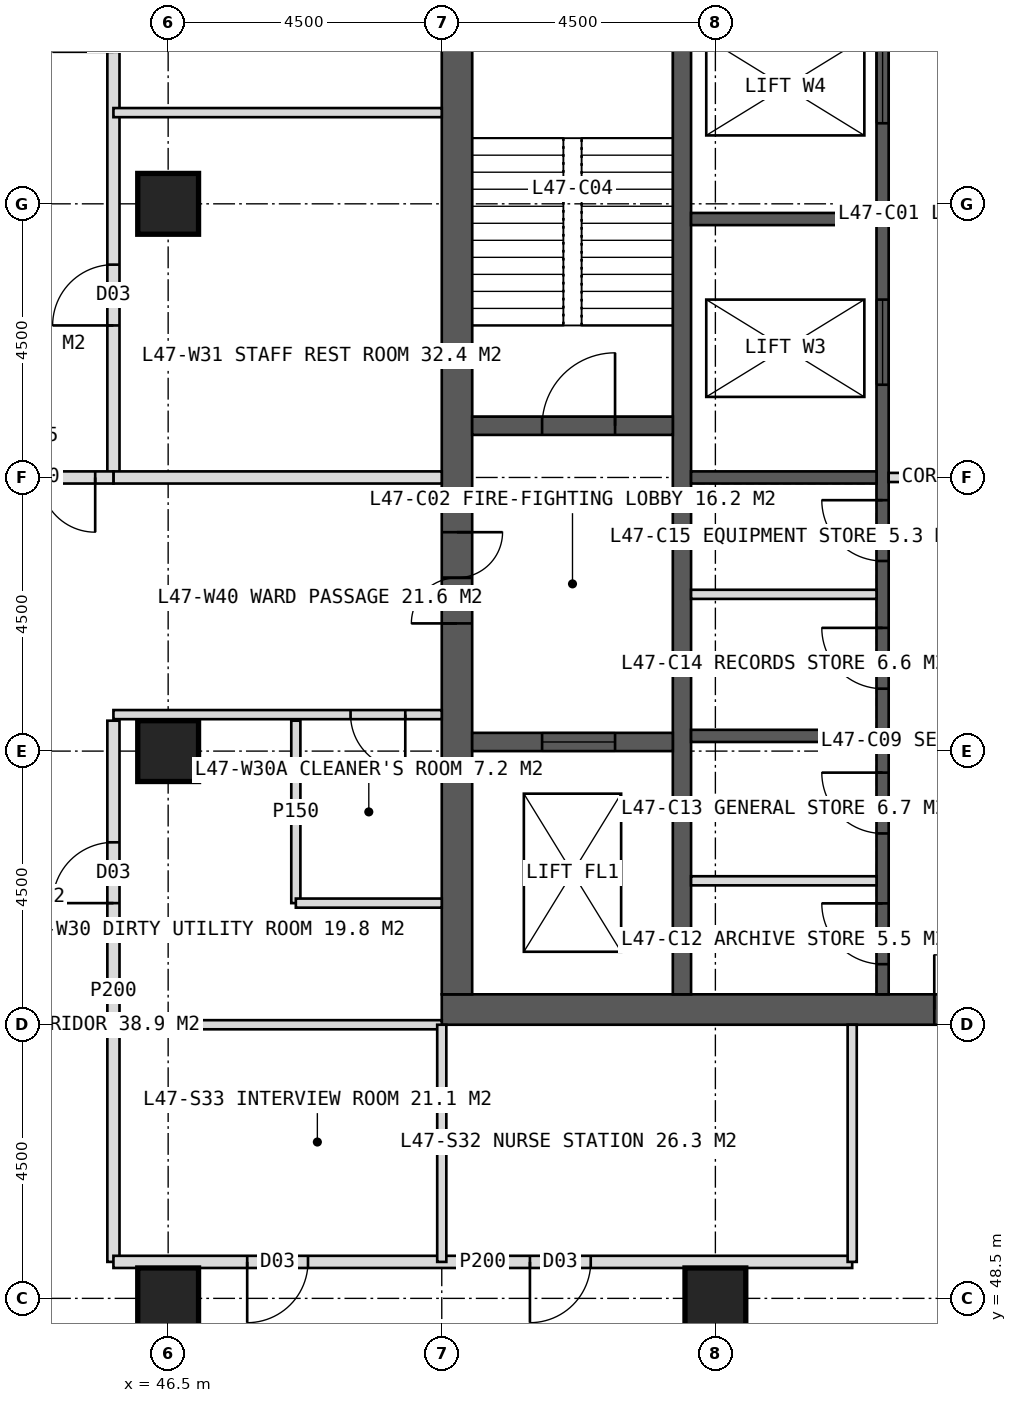
"""IFC4 building model, lengths in metres.
Left out: names, types, materials, properties, quantities, classifications, styles, units other than length and angle.
Written with IfcOpenShell. Run it as: python <this file> out.ifc"""

import sys

from ifc_helpers import new_model, si_unit, direction, frame, frame_2d, origin, origin_2d, place, context, subcontext, project, spatial, rectangle, hollow_rectangle, extrude, element, fill, save


model = new_model("IFC4")
c1 = context("Model", 3, precision=1e-05, world=origin(), true_north=direction((0.0, 1.0)))
c2 = subcontext(c1, "Body", "Model", "MODEL_VIEW")
j1 = project(units=[si_unit("LENGTHUNIT", "METRE"), si_unit("PLANEANGLEUNIT", "RADIAN")], contexts=[c1])
p1 = place(None, origin())
s1 = spatial("IfcSite", under=j1, at=p1, CompositionType="ELEMENT")
p2 = place(p1, origin())
s2 = spatial("IfcBuilding", under=s1, at=p2, CompositionType="ELEMENT")
p3 = place(p2, frame((0.0, 0.0, 197.0)))
s3 = spatial("IfcBuildingStorey", under=s2, at=p3, CompositionType="ELEMENT", Elevation=197.0)
p4 = place(p3, frame((51.0, 53.25, 0.0), z_axis=(0.0, 0.0, 1.0), x_axis=(1.0, 0.0, 0.0)))
e1 = element("IfcWall", 1, at=p4, inside=s3, PredefinedType="SHEAR", context=c2, shape_type="SweptSolid", body=[
    extrude(rectangle(XDim=18.0, YDim=0.5, at=frame_2d((9.0, 0.0))), origin(), (0.0, 0.0, 1.0), 4.0),
])
p5 = place(p4, frame((8.1, 0.0, 0.0)))
e2 = element("IfcOpeningElement", 2, at=p5, cuts=e1, PredefinedType="OPENING", context=c2, shape_type="SweptSolid", body=[
    extrude(rectangle(XDim=1.8, YDim=2.2, at=frame_2d((0.9, 1.1))), frame((0.0, 0.26, 0.0), z_axis=(0.0, -1.0, 0.0), x_axis=(1.0, 0.0, 0.0)), (0.0, 0.0, 1.0), 0.52),
])
p6 = place(p3, frame((51.25, 53.5, 0.0), z_axis=(0.0, 0.0, 1.0), x_axis=(0.0, 1.0, 0.0)))
e3 = element("IfcWall", 3, at=p6, inside=s3, PredefinedType="SHEAR", context=c2, shape_type="SweptSolid", body=[
    extrude(rectangle(XDim=17.0, YDim=0.5, at=frame_2d((8.5, 0.0))), origin(), (0.0, 0.0, 1.0), 4.0),
])
p7 = place(p6, frame((6.1, 0.0, 0.0)))
e4 = element("IfcOpeningElement", 4, at=p7, cuts=e3, PredefinedType="OPENING", context=c2, shape_type="SweptSolid", body=[
    extrude(rectangle(XDim=1.5, YDim=2.2, at=frame_2d((0.75, 1.1))), frame((0.0, 0.26, 0.0), z_axis=(0.0, -1.0, 0.0), x_axis=(1.0, 0.0, 0.0)), (0.0, 0.0, 1.0), 0.52),
])
p8 = place(p3, frame((54.95, 53.5, 0.0), z_axis=(0.0, 0.0, 1.0), x_axis=(0.0, 1.0, 0.0)))
e5 = element("IfcWall", 5, at=p8, inside=s3, PredefinedType="SHEAR", context=c2, shape_type="SweptSolid", body=[
    extrude(rectangle(XDim=17.0, YDim=0.3, at=frame_2d((8.5, 0.0))), origin(), (0.0, 0.0, 1.0), 4.0),
])
p9 = place(p3, frame((58.25, 53.5, 0.0), z_axis=(0.0, 0.0, 1.0), x_axis=(0.0, 1.0, 0.0)))
e6 = element("IfcWall", 6, at=p9, inside=s3, PredefinedType="SHEAR", context=c2, shape_type="SweptSolid", body=[
    extrude(rectangle(XDim=17.0, YDim=0.2, at=frame_2d((8.5, 0.0))), origin(), (0.0, 0.0, 1.0), 4.0),
])
p10 = place(p9, frame((0.496, 0.0, 0.0)))
e7 = element("IfcOpeningElement", 7, at=p10, cuts=e6, PredefinedType="OPENING", context=c2, shape_type="SweptSolid", body=[
    extrude(rectangle(XDim=1.0, YDim=2.1, at=frame_2d((0.5, 1.05))), frame((0.0, 0.11, 0.0), z_axis=(0.0, -1.0, 0.0), x_axis=(1.0, 0.0, 0.0)), (0.0, 0.0, 1.0), 0.22),
])
p11 = place(p9, frame((2.646, 0.0, 0.0)))
e8 = element("IfcOpeningElement", 8, at=p11, cuts=e6, PredefinedType="OPENING", context=c2, shape_type="SweptSolid", body=[
    extrude(rectangle(XDim=1.0, YDim=2.1, at=frame_2d((0.5, 1.05))), frame((0.0, 0.11, 0.0), z_axis=(0.0, -1.0, 0.0), x_axis=(1.0, 0.0, 0.0)), (0.0, 0.0, 1.0), 0.22),
])
p12 = place(p9, frame((5.027, 0.0, 0.0)))
e9 = element("IfcOpeningElement", 9, at=p12, cuts=e6, PredefinedType="OPENING", context=c2, shape_type="SweptSolid", body=[
    extrude(rectangle(XDim=1.0, YDim=2.1, at=frame_2d((0.5, 1.05))), frame((0.0, 0.11, 0.0), z_axis=(0.0, -1.0, 0.0), x_axis=(1.0, 0.0, 0.0)), (0.0, 0.0, 1.0), 0.22),
])
p13 = place(p9, frame((7.126, 0.0, 0.0)))
e10 = element("IfcOpeningElement", 10, at=p13, cuts=e6, PredefinedType="OPENING", context=c2, shape_type="SweptSolid", body=[
    extrude(rectangle(XDim=1.0, YDim=2.1, at=frame_2d((0.5, 1.05))), frame((0.0, 0.11, 0.0), z_axis=(0.0, -1.0, 0.0), x_axis=(1.0, 0.0, 0.0)), (0.0, 0.0, 1.0), 0.22),
])
p14 = place(p9, frame((10.025, 0.0, 0.0)))
e11 = element("IfcOpeningElement", 11, at=p14, cuts=e6, PredefinedType="OPENING", context=c2, shape_type="SweptSolid", body=[
    extrude(rectangle(XDim=1.4, YDim=2.2, at=frame_2d((0.7, 1.1))), frame((0.0, 0.11, 0.0), z_axis=(0.0, -1.0, 0.0), x_axis=(1.0, 0.0, 0.0)), (0.0, 0.0, 1.0), 0.22),
])
p15 = place(p9, frame((14.325, 0.0, 0.0)))
e12 = element("IfcOpeningElement", 12, at=p15, cuts=e6, PredefinedType="OPENING", context=c2, shape_type="SweptSolid", body=[
    extrude(rectangle(XDim=1.4, YDim=2.2, at=frame_2d((0.7, 1.1))), frame((0.0, 0.11, 0.0), z_axis=(0.0, -1.0, 0.0), x_axis=(1.0, 0.0, 0.0)), (0.0, 0.0, 1.0), 0.22),
])
for number, where, z_axis, x_axis in (
    (13, (55.1, 57.75, 0.0), (0.0, 0.0, 1.0), (1.0, 0.0, 0.0)),
    (14, (55.1, 62.0, 0.0), (0.0, 0.0, 1.0), (1.0, 0.0, 0.0)),
    (15, (55.1, 66.25, 0.0), (0.0, 0.0, 1.0), (1.0, 0.0, 0.0)),
):
    element("IfcWall", number, at=place(p3, frame(where, z_axis=z_axis, x_axis=x_axis)), inside=s3, PredefinedType="SHEAR", context=c2, shape_type="SweptSolid", body=[
        extrude(rectangle(XDim=3.05, YDim=0.2, at=frame_2d((1.525, 0.0))), origin(), (0.0, 0.0, 1.0), 4.0),
    ])
p16 = place(p3, frame((51.5, 62.85, 0.0), z_axis=(0.0, 0.0, 1.0), x_axis=(1.0, 0.0, 0.0)))
e16 = element("IfcWall", 16, at=p16, inside=s3, PredefinedType="SHEAR", context=c2, shape_type="SweptSolid", body=[
    extrude(rectangle(XDim=3.3, YDim=0.3, at=frame_2d((1.65, 0.0))), origin(), (0.0, 0.0, 1.0), 4.0),
])
p17 = place(p16, frame((1.15, 0.0, 0.0)))
e17 = element("IfcOpeningElement", 17, at=p17, cuts=e16, PredefinedType="OPENING", context=c2, shape_type="SweptSolid", body=[
    extrude(rectangle(XDim=1.2, YDim=2.1, at=frame_2d((0.6, 1.05))), frame((0.0, 0.16, 0.0), z_axis=(0.0, -1.0, 0.0), x_axis=(1.0, 0.0, 0.0)), (0.0, 0.0, 1.0), 0.32),
])
p18 = place(p3, frame((51.5, 57.65, 0.0), z_axis=(0.0, 0.0, 1.0), x_axis=(1.0, 0.0, 0.0)))
e18 = element("IfcWall", 18, at=p18, inside=s3, PredefinedType="SHEAR", context=c2, shape_type="SweptSolid", body=[
    extrude(rectangle(XDim=3.3, YDim=0.3, at=frame_2d((1.65, 0.0))), origin(), (0.0, 0.0, 1.0), 4.0),
])
p19 = place(p18, frame((1.15, 0.0, 0.0)))
e19 = element("IfcOpeningElement", 19, at=p19, cuts=e18, PredefinedType="OPENING", context=c2, shape_type="SweptSolid", body=[
    extrude(rectangle(XDim=1.2, YDim=2.2, at=frame_2d((0.6, 1.1))), frame((0.0, 0.16, 0.0), z_axis=(0.0, -1.0, 0.0), x_axis=(1.0, 0.0, 0.0)), (0.0, 0.0, 1.0), 0.32),
])
for number, where, z_axis, x_axis in (
    (20, (46.5, 48.5, 0.0), (0.0, 0.0, 1.0), (1.0, 0.0, 0.0)),
    (21, (55.5, 48.5, 0.0), (0.0, 0.0, 1.0), (1.0, 0.0, 0.0)),
    (22, (46.5, 57.5, 0.0), (0.0, 0.0, 1.0), (1.0, 0.0, 0.0)),
    (23, (46.5, 66.5, 0.0), (0.0, 0.0, 1.0), (1.0, 0.0, 0.0)),
):
    element("IfcColumn", number, at=place(p3, frame(where, z_axis=z_axis, x_axis=x_axis)), inside=s3, PredefinedType="COLUMN", context=c2, shape_type="SweptSolid", body=[
        extrude(hollow_rectangle(XDim=1.0, YDim=1.0, WallThickness=0.1, at=origin_2d()), origin(), (0.0, 0.0, 1.0), 4.0),
    ])
p20 = place(p3, frame((51.0, 53.0, 0.0), z_axis=(0.0, 0.0, 1.0), x_axis=(-1.0, 0.0, 0.0)))
e24 = element("IfcWall", 24, at=p20, inside=s3, PredefinedType="PARTITIONING", context=c2, shape_type="SweptSolid", body=[
    extrude(rectangle(XDim=5.4, YDim=0.15, at=frame_2d((2.7, 0.0))), origin(), (0.0, 0.0, 1.0), 3.75),
])
p21 = place(p3, frame((45.6, 49.1, 0.0), z_axis=(0.0, 0.0, 1.0), x_axis=(0.0, 1.0, 0.0)))
e25 = element("IfcWall", 25, at=p21, inside=s3, PredefinedType="PARTITIONING", context=c2, shape_type="SweptSolid", body=[
    extrude(rectangle(XDim=8.9, YDim=0.2, at=frame_2d((4.45, 0.0))), origin(), (0.0, 0.0, 1.0), 3.75),
])
p22 = place(p21, frame((5.9, 0.0, 0.0)))
e26 = element("IfcOpeningElement", 26, at=p22, cuts=e25, PredefinedType="OPENING", context=c2, shape_type="SweptSolid", body=[
    extrude(rectangle(XDim=1.0, YDim=2.1, at=frame_2d((0.5, 1.05))), frame((0.0, 0.11, 0.0), z_axis=(0.0, -1.0, 0.0), x_axis=(1.0, 0.0, 0.0)), (0.0, 0.0, 1.0), 0.22),
])
p23 = place(p3, frame((45.6, 62.0, 0.0), z_axis=(0.0, 0.0, 1.0), x_axis=(0.0, 1.0, 0.0)))
e27 = element("IfcWall", 27, at=p23, inside=s3, PredefinedType="PARTITIONING", context=c2, shape_type="SweptSolid", body=[
    extrude(rectangle(XDim=14.4, YDim=0.2, at=frame_2d((7.2, 0.0))), origin(), (0.0, 0.0, 1.0), 3.75),
])
p24 = place(p23, frame((2.5, 0.0, 0.0)))
e28 = element("IfcOpeningElement", 28, at=p24, cuts=e27, PredefinedType="OPENING", context=c2, shape_type="SweptSolid", body=[
    extrude(rectangle(XDim=1.0, YDim=2.1, at=frame_2d((0.5, 1.05))), frame((0.0, 0.11, 0.0), z_axis=(0.0, -1.0, 0.0), x_axis=(1.0, 0.0, 0.0)), (0.0, 0.0, 1.0), 0.22),
])
p25 = place(p23, frame((7.0, 0.0, 0.0)))
e29 = element("IfcOpeningElement", 29, at=p25, cuts=e27, PredefinedType="OPENING", context=c2, shape_type="SweptSolid", body=[
    extrude(rectangle(XDim=1.0, YDim=2.1, at=frame_2d((0.5, 1.05))), frame((0.0, 0.11, 0.0), z_axis=(0.0, -1.0, 0.0), x_axis=(1.0, 0.0, 0.0)), (0.0, 0.0, 1.0), 0.22),
])
p26 = place(p23, frame((11.2, 0.0, 0.0)))
e30 = element("IfcOpeningElement", 30, at=p26, cuts=e27, PredefinedType="OPENING", context=c2, shape_type="SweptSolid", body=[
    extrude(rectangle(XDim=1.0, YDim=2.1, at=frame_2d((0.5, 1.05))), frame((0.0, 0.11, 0.0), z_axis=(0.0, -1.0, 0.0), x_axis=(1.0, 0.0, 0.0)), (0.0, 0.0, 1.0), 0.22),
])
p27 = place(p3, frame((51.0, 58.1, 0.0), z_axis=(0.0, 0.0, 1.0), x_axis=(-1.0, 0.0, 0.0)))
e31 = element("IfcWall", 31, at=p27, inside=s3, PredefinedType="PARTITIONING", context=c2, shape_type="SweptSolid", body=[
    extrude(rectangle(XDim=5.4, YDim=0.15, at=frame_2d((2.7, 0.0))), origin(), (0.0, 0.0, 1.0), 3.75),
])
p28 = place(p27, frame((0.6, 0.0, 0.0)))
e32 = element("IfcOpeningElement", 32, at=p28, cuts=e31, PredefinedType="OPENING", context=c2, shape_type="SweptSolid", body=[
    extrude(rectangle(XDim=0.9, YDim=2.1, at=frame_2d((0.45, 1.05))), frame((0.0, 0.085, 0.0), z_axis=(0.0, -1.0, 0.0), x_axis=(1.0, 0.0, 0.0)), (0.0, 0.0, 1.0), 0.17),
])
p29 = place(p3, frame((51.0, 62.0, 0.0), z_axis=(0.0, 0.0, 1.0), x_axis=(-1.0, 0.0, 0.0)))
e33 = element("IfcWall", 33, at=p29, inside=s3, PredefinedType="SOLIDWALL", context=c2, shape_type="SweptSolid", body=[
    extrude(rectangle(XDim=5.4, YDim=0.2, at=frame_2d((2.7, 0.0))), origin(), (0.0, 0.0, 1.0), 2.95),
])
p30 = place(p3, frame((51.0, 68.0, 0.0), z_axis=(0.0, 0.0, 1.0), x_axis=(-1.0, 0.0, 0.0)))
e34 = element("IfcWall", 34, at=p30, inside=s3, PredefinedType="PARTITIONING", context=c2, shape_type="SweptSolid", body=[
    extrude(rectangle(XDim=5.4, YDim=0.15, at=frame_2d((2.7, 0.0))), origin(), (0.0, 0.0, 1.0), 3.75),
])
p31 = place(p3, frame((48.6, 55.0, 0.0), z_axis=(0.0, 0.0, 1.0), x_axis=(0.0, 1.0, 0.0)))
e35 = element("IfcWall", 35, at=p31, inside=s3, PredefinedType="PARTITIONING", context=c2, shape_type="SweptSolid", body=[
    extrude(rectangle(XDim=3.0, YDim=0.15, at=frame_2d((1.5, 0.0))), origin(), (0.0, 0.0, 1.0), 3.75),
])
p32 = place(p3, frame((51.0, 55.0, 0.0), z_axis=(0.0, 0.0, 1.0), x_axis=(-1.0, 0.0, 0.0)))
e36 = element("IfcWall", 36, at=p32, inside=s3, PredefinedType="PARTITIONING", context=c2, shape_type="SweptSolid", body=[
    extrude(rectangle(XDim=2.4, YDim=0.15, at=frame_2d((1.2, 0.0))), origin(), (0.0, 0.0, 1.0), 3.75),
])
p33 = place(p3, frame((57.75, 49.1, 0.0), z_axis=(0.0, 0.0, 1.0), x_axis=(-1.0, 0.0, 0.0)))
e37 = element("IfcWall", 37, at=p33, inside=s3, PredefinedType="PARTITIONING", context=c2, shape_type="SweptSolid", body=[
    extrude(rectangle(XDim=12.15, YDim=0.2, at=frame_2d((6.075, 0.0))), origin(), (0.0, 0.0, 1.0), 3.75),
])
p34 = place(p33, frame((4.3, 0.0, 0.0)))
e38 = element("IfcOpeningElement", 38, at=p34, cuts=e37, PredefinedType="OPENING", context=c2, shape_type="SweptSolid", body=[
    extrude(rectangle(XDim=1.0, YDim=2.1, at=frame_2d((0.5, 1.05))), frame((0.0, 0.11, 0.0), z_axis=(0.0, -1.0, 0.0), x_axis=(1.0, 0.0, 0.0)), (0.0, 0.0, 1.0), 0.22),
])
p35 = place(p33, frame((8.95, 0.0, 0.0)))
e39 = element("IfcOpeningElement", 39, at=p35, cuts=e37, PredefinedType="OPENING", context=c2, shape_type="SweptSolid", body=[
    extrude(rectangle(XDim=1.0, YDim=2.1, at=frame_2d((0.5, 1.05))), frame((0.0, 0.11, 0.0), z_axis=(0.0, -1.0, 0.0), x_axis=(1.0, 0.0, 0.0)), (0.0, 0.0, 1.0), 0.22),
])
for number, where, z_axis, x_axis in (
    (40, (57.75, 53.0, 0.0), (0.0, 0.0, 1.0), (0.0, -1.0, 0.0)),
    (41, (51.0, 53.0, 0.0), (0.0, 0.0, 1.0), (0.0, -1.0, 0.0)),
):
    element("IfcWall", number, at=place(p3, frame(where, z_axis=z_axis, x_axis=x_axis)), inside=s3, PredefinedType="PARTITIONING", context=c2, shape_type="SweptSolid", body=[
        extrude(rectangle(XDim=3.9, YDim=0.15, at=frame_2d((1.95, 0.0))), origin(), (0.0, 0.0, 1.0), 3.75),
    ])
p36 = place(p3, frame((45.6, 62.0, 0.0), z_axis=(0.0, 0.0, 1.0), x_axis=(-1.0, 0.0, 0.0)))
e42 = element("IfcWall", 42, at=p36, inside=s3, PredefinedType="SOLIDWALL", context=c2, shape_type="SweptSolid", body=[
    extrude(rectangle(XDim=2.7, YDim=0.2, at=frame_2d((1.35, 0.0))), origin(), (0.0, 0.0, 1.0), 2.95),
])
p37 = place(p36, frame((0.3, 0.0, 0.0)))
e43 = element("IfcOpeningElement", 43, at=p37, cuts=e42, PredefinedType="OPENING", context=c2, shape_type="SweptSolid", body=[
    extrude(rectangle(XDim=1.8, YDim=2.2, at=frame_2d((0.9, 1.1))), frame((0.0, 0.11, 0.0), z_axis=(0.0, -1.0, 0.0), x_axis=(1.0, 0.0, 0.0)), (0.0, 0.0, 1.0), 0.22),
])
for number, where, z_axis, x_axis in (
    (44, (55.1, 55.367, 0.0), (0.0, 0.0, 1.0), (1.0, 0.0, 0.0)),
    (45, (55.1, 60.078, 0.0), (0.0, 0.0, 1.0), (1.0, 0.0, 0.0)),
):
    element("IfcWall", number, at=place(p3, frame(where, z_axis=z_axis, x_axis=x_axis)), inside=s3, PredefinedType="PARTITIONING", context=c2, shape_type="SweptSolid", body=[
        extrude(rectangle(XDim=3.05, YDim=0.15, at=frame_2d((1.525, 0.0))), origin(), (0.0, 0.0, 1.0), 3.75),
    ])
p38 = place(p3, frame((58.35, 62.0, 0.0), z_axis=(0.0, 0.0, 1.0), x_axis=(1.0, 0.0, 0.0)))
e46 = element("IfcWall", 46, at=p38, inside=s3, PredefinedType="PARTITIONING", context=c2, shape_type="SweptSolid", body=[
    extrude(rectangle(XDim=3.3, YDim=0.15, at=frame_2d((1.65, 0.0))), origin(), (0.0, 0.0, 1.0), 3.75),
])
p39 = place(p28, origin())
e47 = element("IfcDoor", 47, at=p39, inside=s3, OperationType="SINGLE_SWING_LEFT", PredefinedType="DOOR", context=c2, shape_type="SweptSolid", body=[
    extrude(rectangle(XDim=0.9, YDim=2.1, at=frame_2d((0.45, 1.05))), frame((0.0, 0.025, 0.0), z_axis=(0.0, -1.0, 0.0), x_axis=(1.0, 0.0, 0.0)), (0.0, 0.0, 1.0), 0.05),
])
fill(e32, e47)
p40 = place(p22, origin())
e48 = element("IfcDoor", 48, at=p40, inside=s3, OperationType="SINGLE_SWING_LEFT", PredefinedType="DOOR", context=c2, shape_type="SweptSolid", body=[
    extrude(rectangle(XDim=1.0, YDim=2.1, at=frame_2d((0.5, 1.05))), frame((0.0, 0.025, 0.0), z_axis=(0.0, -1.0, 0.0), x_axis=(1.0, 0.0, 0.0)), (0.0, 0.0, 1.0), 0.05),
])
fill(e26, e48)
p41 = place(p24, origin())
e49 = element("IfcDoor", 49, at=p41, inside=s3, OperationType="SINGLE_SWING_LEFT", PredefinedType="DOOR", context=c2, shape_type="SweptSolid", body=[
    extrude(rectangle(XDim=1.0, YDim=2.1, at=frame_2d((0.5, 1.05))), frame((0.0, 0.025, 0.0), z_axis=(0.0, -1.0, 0.0), x_axis=(1.0, 0.0, 0.0)), (0.0, 0.0, 1.0), 0.05),
])
fill(e28, e49)
p42 = place(p34, origin())
e50 = element("IfcDoor", 50, at=p42, inside=s3, OperationType="SINGLE_SWING_RIGHT", PredefinedType="DOOR", context=c2, shape_type="SweptSolid", body=[
    extrude(rectangle(XDim=1.0, YDim=2.1, at=frame_2d((0.5, 1.05))), frame((0.0, 0.025, 0.0), z_axis=(0.0, -1.0, 0.0), x_axis=(1.0, 0.0, 0.0)), (0.0, 0.0, 1.0), 0.05),
])
fill(e38, e50)
p43 = place(p35, origin())
e51 = element("IfcDoor", 51, at=p43, inside=s3, OperationType="SINGLE_SWING_RIGHT", PredefinedType="DOOR", context=c2, shape_type="SweptSolid", body=[
    extrude(rectangle(XDim=1.0, YDim=2.1, at=frame_2d((0.5, 1.05))), frame((0.0, 0.025, 0.0), z_axis=(0.0, -1.0, 0.0), x_axis=(1.0, 0.0, 0.0)), (0.0, 0.0, 1.0), 0.05),
])
fill(e39, e51)
p44 = place(p37, origin())
e52 = element("IfcDoor", 52, at=p44, inside=s3, OperationType="DOUBLE_DOOR_DOUBLE_SWING", PredefinedType="DOOR", context=c2, shape_type="SweptSolid", body=[
    extrude(rectangle(XDim=1.8, YDim=2.2, at=frame_2d((0.9, 1.1))), frame((0.0, 0.025, 0.0), z_axis=(0.0, -1.0, 0.0), x_axis=(1.0, 0.0, 0.0)), (0.0, 0.0, 1.0), 0.05),
])
fill(e43, e52)
p45 = place(p7, origin())
e53 = element("IfcDoor", 53, at=p45, inside=s3, OperationType="DOUBLE_DOOR_SINGLE_SWING", PredefinedType="DOOR", context=c2, shape_type="SweptSolid", body=[
    extrude(rectangle(XDim=1.5, YDim=2.2, at=frame_2d((0.75, 1.1))), frame((0.0, 0.025, 0.0), z_axis=(0.0, -1.0, 0.0), x_axis=(1.0, 0.0, 0.0)), (0.0, 0.0, 1.0), 0.05),
])
fill(e4, e53)
p46 = place(p17, origin())
e54 = element("IfcDoor", 54, at=p46, inside=s3, OperationType="SINGLE_SWING_RIGHT", PredefinedType="DOOR", context=c2, shape_type="SweptSolid", body=[
    extrude(rectangle(XDim=1.2, YDim=2.1, at=frame_2d((0.6, 1.05))), frame((0.0, 0.025, 0.0), z_axis=(0.0, -1.0, 0.0), x_axis=(1.0, 0.0, 0.0)), (0.0, 0.0, 1.0), 0.05),
])
fill(e17, e54)
p47 = place(p19, origin())
e55 = element("IfcDoor", 55, at=p47, inside=s3, OperationType="SLIDING_TO_LEFT", PredefinedType="DOOR", context=c2, shape_type="SweptSolid", body=[
    extrude(rectangle(XDim=1.2, YDim=2.2, at=frame_2d((0.6, 1.1))), frame((0.0, 0.025, 0.0), z_axis=(0.0, -1.0, 0.0), x_axis=(1.0, 0.0, 0.0)), (0.0, 0.0, 1.0), 0.05),
])
fill(e19, e55)
p48 = place(p10, origin())
e56 = element("IfcDoor", 56, at=p48, inside=s3, OperationType="SINGLE_SWING_RIGHT", PredefinedType="DOOR", context=c2, shape_type="SweptSolid", body=[
    extrude(rectangle(XDim=1.0, YDim=2.1, at=frame_2d((0.5, 1.05))), frame((0.0, 0.025, 0.0), z_axis=(0.0, -1.0, 0.0), x_axis=(1.0, 0.0, 0.0)), (0.0, 0.0, 1.0), 0.05),
])
fill(e7, e56)
p49 = place(p11, origin())
e57 = element("IfcDoor", 57, at=p49, inside=s3, OperationType="SINGLE_SWING_RIGHT", PredefinedType="DOOR", context=c2, shape_type="SweptSolid", body=[
    extrude(rectangle(XDim=1.0, YDim=2.1, at=frame_2d((0.5, 1.05))), frame((0.0, 0.025, 0.0), z_axis=(0.0, -1.0, 0.0), x_axis=(1.0, 0.0, 0.0)), (0.0, 0.0, 1.0), 0.05),
])
fill(e8, e57)
p50 = place(p12, origin())
e58 = element("IfcDoor", 58, at=p50, inside=s3, OperationType="SINGLE_SWING_RIGHT", PredefinedType="DOOR", context=c2, shape_type="SweptSolid", body=[
    extrude(rectangle(XDim=1.0, YDim=2.1, at=frame_2d((0.5, 1.05))), frame((0.0, 0.025, 0.0), z_axis=(0.0, -1.0, 0.0), x_axis=(1.0, 0.0, 0.0)), (0.0, 0.0, 1.0), 0.05),
])
fill(e9, e58)
p51 = place(p13, origin())
e59 = element("IfcDoor", 59, at=p51, inside=s3, OperationType="SINGLE_SWING_RIGHT", PredefinedType="DOOR", context=c2, shape_type="SweptSolid", body=[
    extrude(rectangle(XDim=1.0, YDim=2.1, at=frame_2d((0.5, 1.05))), frame((0.0, 0.025, 0.0), z_axis=(0.0, -1.0, 0.0), x_axis=(1.0, 0.0, 0.0)), (0.0, 0.0, 1.0), 0.05),
])
fill(e10, e59)
p52 = place(p14, origin())
e60 = element("IfcDoor", 60, at=p52, inside=s3, OperationType="SLIDING_TO_LEFT", PredefinedType="DOOR", context=c2, shape_type="SweptSolid", body=[
    extrude(rectangle(XDim=1.4, YDim=2.2, at=frame_2d((0.7, 1.1))), frame((0.0, 0.025, 0.0), z_axis=(0.0, -1.0, 0.0), x_axis=(1.0, 0.0, 0.0)), (0.0, 0.0, 1.0), 0.05),
])
fill(e11, e60)
p53 = place(p15, origin())
e61 = element("IfcDoor", 61, at=p53, inside=s3, OperationType="SLIDING_TO_LEFT", PredefinedType="DOOR", context=c2, shape_type="SweptSolid", body=[
    extrude(rectangle(XDim=1.4, YDim=2.2, at=frame_2d((0.7, 1.1))), frame((0.0, 0.025, 0.0), z_axis=(0.0, -1.0, 0.0), x_axis=(1.0, 0.0, 0.0)), (0.0, 0.0, 1.0), 0.05),
])
fill(e12, e61)
p54 = place(p5, origin())
e62 = element("IfcDoor", 62, at=p54, inside=s3, OperationType="DOUBLE_DOOR_SINGLE_SWING", PredefinedType="DOOR", context=c2, shape_type="SweptSolid", body=[
    extrude(rectangle(XDim=1.8, YDim=2.2, at=frame_2d((0.9, 1.1))), frame((0.0, 0.025, 0.0), z_axis=(0.0, -1.0, 0.0), x_axis=(1.0, 0.0, 0.0)), (0.0, 0.0, 1.0), 0.05),
])
fill(e2, e62)
save(model, sys.argv[1])
